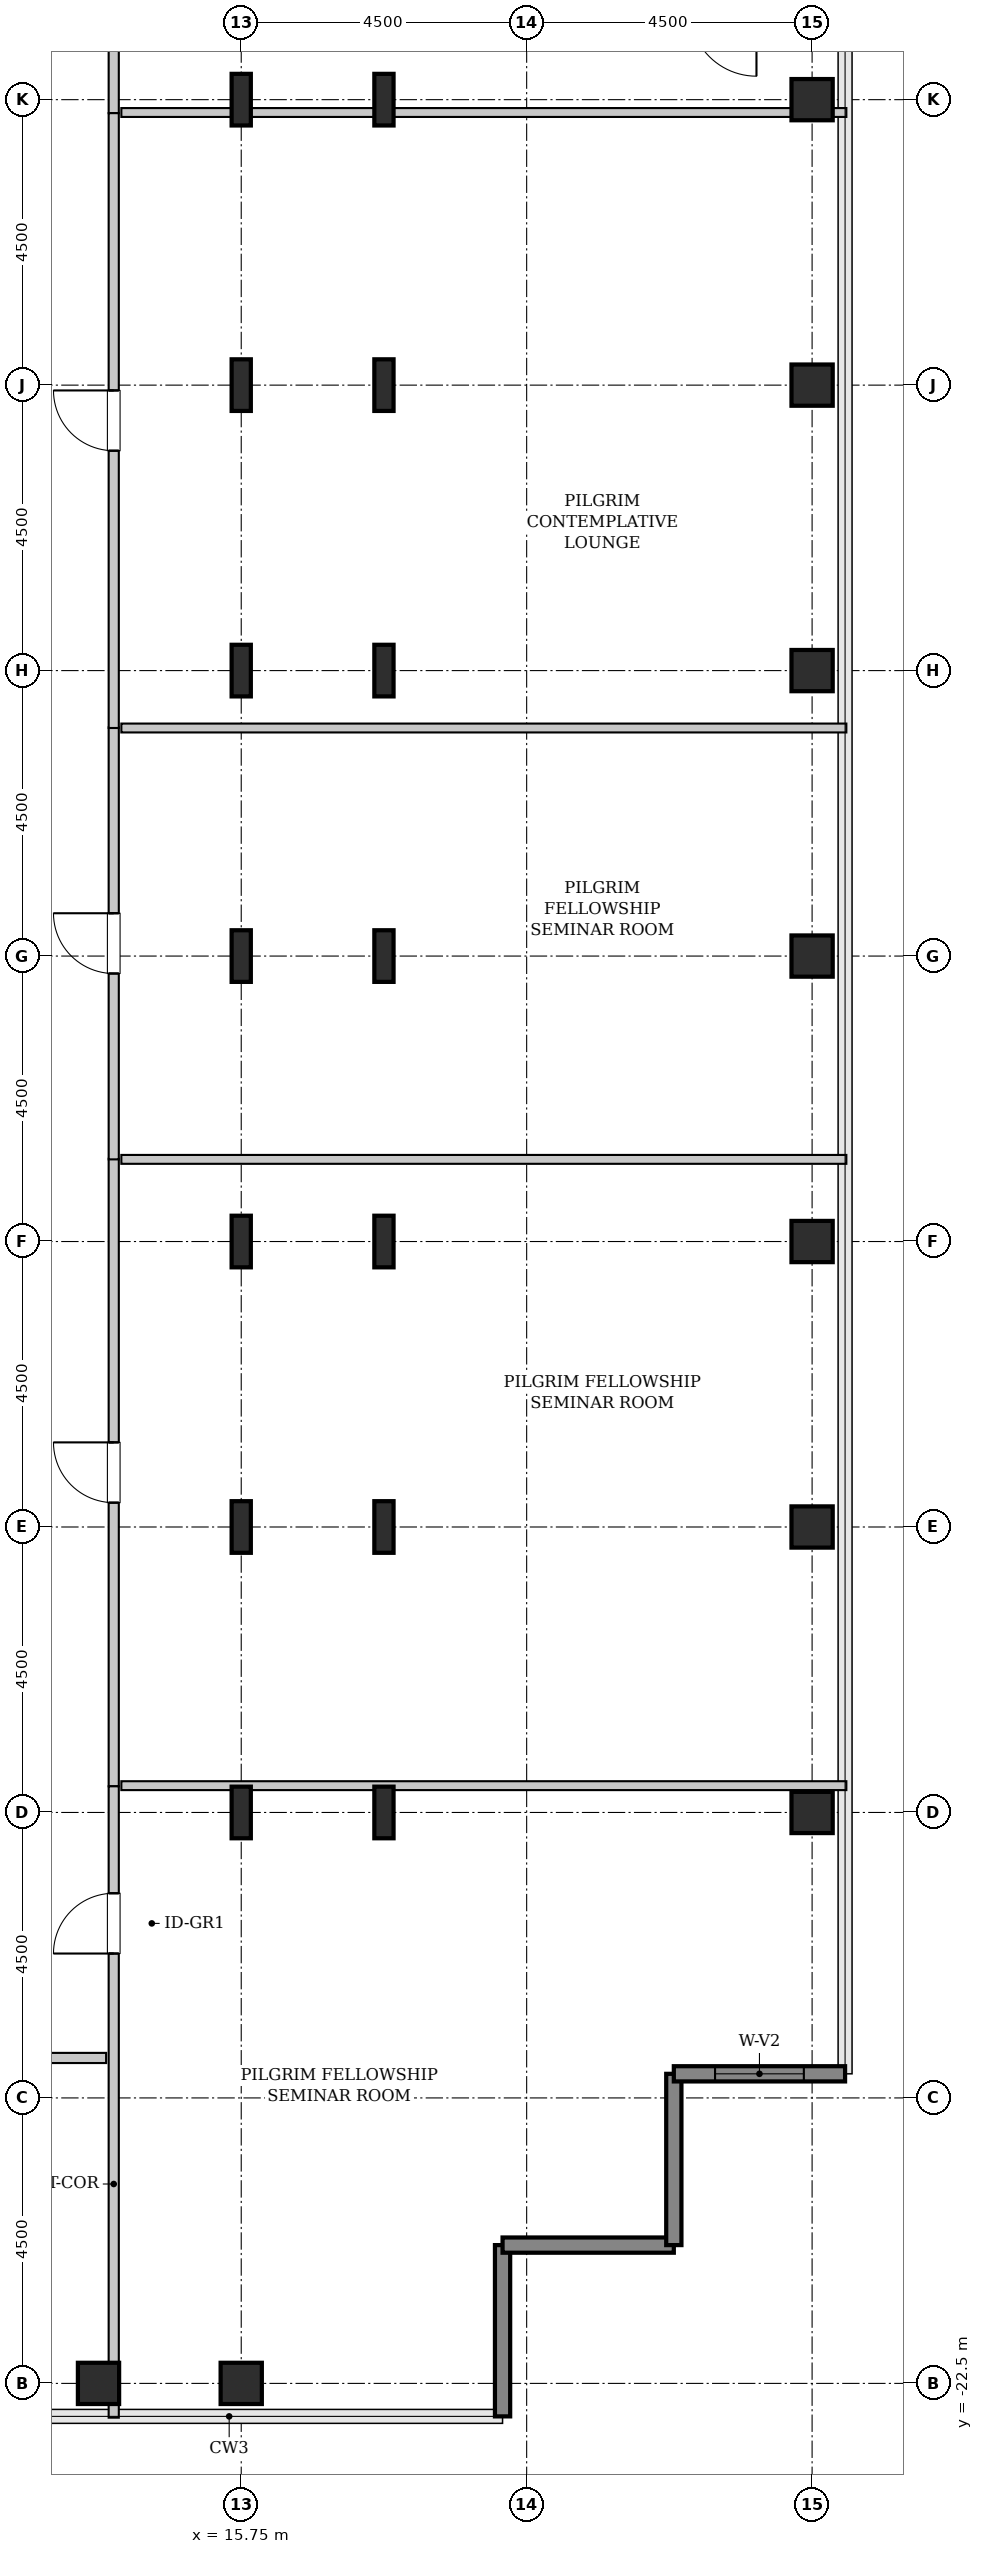
"""IFC4 building model, lengths in metres.
Left out: names, types, materials, properties, quantities, classifications, styles, units other than length and angle.
Written with IfcOpenShell. Run it as: python <this file> out.ifc"""

import sys

from ifc_helpers import new_model, si_unit, direction, frame, frame_2d, origin, origin_2d, place, context, subcontext, project, spatial, rectangle, hollow_rectangle, i_section, extrude, source, transform, mapped, element, fill, save


model = new_model("IFC4")
c1 = context("Model", 3, precision=1e-05, world=origin(), true_north=direction((0.0, 1.0)))
c2 = subcontext(c1, "Body", "Model", "MODEL_VIEW")
j1 = project(units=[si_unit("LENGTHUNIT", "METRE"), si_unit("PLANEANGLEUNIT", "RADIAN")], contexts=[c1])
p1 = place(None, origin())
s1 = spatial("IfcSite", under=j1, at=p1, CompositionType="ELEMENT")
p2 = place(p1, origin())
s2 = spatial("IfcBuilding", under=s1, at=p2, CompositionType="ELEMENT")
p3 = place(p2, frame((0.0, 0.0, 221.8)))
s3 = spatial("IfcBuildingStorey", under=s2, at=p3, CompositionType="ELEMENT", Elevation=221.8)
m1 = source(origin(), c2, "Body", "SweptSolid", [
    extrude(hollow_rectangle(XDim=0.65, YDim=0.65, WallThickness=0.032, InnerFilletRadius=0.032, OuterFilletRadius=0.064, at=origin_2d()), origin(), (0.0, 0.0, 1.0), 3.8),
])
for number, where, z_axis, x_axis in (
    (1, (13.5, -22.5, 0.0), (0.0, 0.0, 1.0), (1.0, 0.0, 0.0)),
    (2, (15.75, -22.5, 0.0), (0.0, 0.0, 1.0), (1.0, 0.0, 0.0)),
):
    element("IfcColumn", number, at=place(p3, frame(where, z_axis=z_axis, x_axis=x_axis)), inside=s3, PredefinedType="COLUMN", context=c2, shape_type="MappedRepresentation", body=[
        mapped(m1, transform((0.0, 0.0, 0.0), x_axis=(1.0, 0.0, 0.0), y_axis=(0.0, 1.0, 0.0), z_axis=(0.0, 0.0, 1.0), scale=1.0)),
    ])
m2 = source(origin(), c2, "Body", "SweptSolid", [
    extrude(i_section(OverallWidth=0.303, OverallDepth=0.814, WebThickness=0.021, FlangeThickness=0.04, FilletRadius=0.03, at=origin_2d()), origin(), (0.0, 0.0, 1.0), 3.8),
])
for number, where, z_axis, x_axis in (
    (3, (15.75, -13.5, 0.0), (0.0, 0.0, 1.0), (1.0, 0.0, 0.0)),
    (4, (15.75, -9.0, 0.0), (0.0, 0.0, 1.0), (1.0, 0.0, 0.0)),
    (5, (15.75, -4.5, 0.0), (0.0, 0.0, 1.0), (1.0, 0.0, 0.0)),
    (6, (15.75, 0.0, 0.0), (0.0, 0.0, 1.0), (1.0, 0.0, 0.0)),
    (7, (15.75, 4.5, 0.0), (0.0, 0.0, 1.0), (1.0, 0.0, 0.0)),
    (8, (15.75, 9.0, 0.0), (0.0, 0.0, 1.0), (1.0, 0.0, 0.0)),
    (9, (15.75, 13.5, 0.0), (0.0, 0.0, 1.0), (1.0, 0.0, 0.0)),
    (10, (18.0, -13.5, 0.0), (0.0, 0.0, 1.0), (1.0, 0.0, 0.0)),
    (11, (18.0, -9.0, 0.0), (0.0, 0.0, 1.0), (1.0, 0.0, 0.0)),
    (12, (18.0, -4.5, 0.0), (0.0, 0.0, 1.0), (1.0, 0.0, 0.0)),
    (13, (18.0, 0.0, 0.0), (0.0, 0.0, 1.0), (1.0, 0.0, 0.0)),
    (14, (18.0, 4.5, 0.0), (0.0, 0.0, 1.0), (1.0, 0.0, 0.0)),
    (15, (18.0, 9.0, 0.0), (0.0, 0.0, 1.0), (1.0, 0.0, 0.0)),
    (16, (18.0, 13.5, 0.0), (0.0, 0.0, 1.0), (1.0, 0.0, 0.0)),
):
    element("IfcColumn", number, at=place(p3, frame(where, z_axis=z_axis, x_axis=x_axis)), inside=s3, PredefinedType="COLUMN", context=c2, shape_type="MappedRepresentation", body=[
        mapped(m2, transform((0.0, 0.0, 0.0), x_axis=(1.0, 0.0, 0.0), y_axis=(0.0, 1.0, 0.0), z_axis=(0.0, 0.0, 1.0), scale=1.0)),
    ])
for number, where, z_axis, x_axis in (
    (17, (24.75, -13.5, 0.0), (0.0, 0.0, 1.0), (1.0, 0.0, 0.0)),
    (18, (24.75, -9.0, 0.0), (0.0, 0.0, 1.0), (1.0, 0.0, 0.0)),
    (19, (24.75, -4.5, 0.0), (0.0, 0.0, 1.0), (1.0, 0.0, 0.0)),
    (20, (24.75, 0.0, 0.0), (0.0, 0.0, 1.0), (1.0, 0.0, 0.0)),
    (21, (24.75, 4.5, 0.0), (0.0, 0.0, 1.0), (1.0, 0.0, 0.0)),
    (22, (24.75, 9.0, 0.0), (0.0, 0.0, 1.0), (1.0, 0.0, 0.0)),
    (23, (24.75, 13.5, 0.0), (0.0, 0.0, 1.0), (1.0, 0.0, 0.0)),
):
    element("IfcColumn", number, at=place(p3, frame(where, z_axis=z_axis, x_axis=x_axis)), inside=s3, PredefinedType="COLUMN", context=c2, shape_type="MappedRepresentation", body=[
        mapped(m1, transform((0.0, 0.0, 0.0), x_axis=(1.0, 0.0, 0.0), y_axis=(0.0, 1.0, 0.0), z_axis=(0.0, 0.0, 1.0), scale=1.0)),
    ])
m3 = source(origin(), c2, "Body", "SweptSolid", [
    extrude(rectangle(XDim=2.7, YDim=0.24, at=frame_2d((1.35, 0.0))), origin(), (0.0, 0.0, 1.0), 3.55),
])
for number, where, z_axis, x_axis in (
    (24, (19.87, -23.02, 0.0), (0.0, 0.0, 1.0), (0.0, 1.0, 0.0)),
    (25, (19.87, -20.32, 0.0), (0.0, 0.0, 1.0), (1.0, 0.0, 0.0)),
    (26, (22.57, -20.32, 0.0), (0.0, 0.0, 1.0), (0.0, 1.0, 0.0)),
):
    element("IfcWall", number, at=place(p3, frame(where, z_axis=z_axis, x_axis=x_axis)), inside=s3, PredefinedType="SHEAR", context=c2, shape_type="MappedRepresentation", body=[
        mapped(m3, transform((0.0, 0.0, 0.0), x_axis=(1.0, 0.0, 0.0), y_axis=(0.0, 1.0, 0.0), z_axis=(0.0, 0.0, 1.0), scale=1.0)),
    ])
p4 = place(p3, frame((22.57, -17.62, 0.0), z_axis=(0.0, 0.0, 1.0), x_axis=(1.0, 0.0, 0.0)))
e27 = element("IfcWall", 27, at=p4, inside=s3, PredefinedType="SHEAR", context=c2, shape_type="MappedRepresentation", body=[
    mapped(m3, transform((0.0, 0.0, 0.0), x_axis=(1.0, 0.0, 0.0), y_axis=(0.0, 1.0, 0.0), z_axis=(0.0, 0.0, 1.0), scale=1.0)),
])
p5 = place(p4, frame((0.65, 0.0, 0.85)))
e28 = element("IfcOpeningElement", 28, at=p5, cuts=e27, PredefinedType="OPENING", context=c2, shape_type="SweptSolid", body=[
    extrude(rectangle(XDim=1.4, YDim=1.8, at=frame_2d((0.7, 0.9))), frame((0.0, 0.13, 0.0), z_axis=(0.0, -1.0, 0.0), x_axis=(1.0, 0.0, 0.0)), (0.0, 0.0, 1.0), 0.26),
])
m4 = source(origin(), c2, "Body", "SweptSolid", [
    extrude(rectangle(XDim=9.892, YDim=0.16, at=frame_2d((4.946, 0.0))), origin(), (0.0, 0.0, 1.0), 3.535),
])
p6 = place(p3, frame((13.74, -13.087, 0.0), z_axis=(0.0, 0.0, 1.0), x_axis=(0.0, 1.0, 0.0)))
e29 = element("IfcWall", 29, at=p6, inside=s3, PredefinedType="PARTITIONING", context=c2, shape_type="MappedRepresentation", body=[
    mapped(m4, transform((0.0, 0.0, 0.0), x_axis=(1.0, 0.0, 0.0), y_axis=(0.0, 1.0, 0.0), z_axis=(0.0, 0.0, 1.0), scale=1.0)),
])
p7 = place(p6, frame((4.471, 0.0, 0.0)))
e30 = element("IfcOpeningElement", 30, at=p7, cuts=e29, PredefinedType="OPENING", context=c2, shape_type="SweptSolid", body=[
    extrude(rectangle(XDim=0.95, YDim=2.1, at=frame_2d((0.475, 1.05))), frame((0.0, 0.09, 0.0), z_axis=(0.0, -1.0, 0.0), x_axis=(1.0, 0.0, 0.0)), (0.0, 0.0, 1.0), 0.18),
])
m5 = source(origin(), c2, "Body", "SweptSolid", [
    extrude(rectangle(XDim=11.43, YDim=0.14, at=frame_2d((5.715, 0.0))), origin(), (0.0, 0.0, 1.0), 2.925),
])
p8 = place(p3, frame((13.86, -13.077, 0.0), z_axis=(0.0, 0.0, 1.0), x_axis=(1.0, 0.0, 0.0)))
e31 = element("IfcWall", 31, at=p8, inside=s3, PredefinedType="PARTITIONING", context=c2, shape_type="MappedRepresentation", body=[
    mapped(m5, transform((0.0, 0.0, 0.0), x_axis=(1.0, 0.0, 0.0), y_axis=(0.0, 1.0, 0.0), z_axis=(0.0, 0.0, 1.0), scale=1.0)),
])
m6 = source(origin(), c2, "Body", "SweptSolid", [
    extrude(rectangle(XDim=11.43, YDim=0.14, at=frame_2d((5.715, 0.0))), origin(), (0.0, 0.0, 1.0), 3.535),
])
p9 = place(p3, frame((13.86, -3.205, 0.0), z_axis=(0.0, 0.0, 1.0), x_axis=(1.0, 0.0, 0.0)))
e32 = element("IfcWall", 32, at=p9, inside=s3, PredefinedType="PARTITIONING", context=c2, shape_type="MappedRepresentation", body=[
    mapped(m6, transform((0.0, 0.0, 0.0), x_axis=(1.0, 0.0, 0.0), y_axis=(0.0, 1.0, 0.0), z_axis=(0.0, 0.0, 1.0), scale=1.0)),
])
m7 = source(origin(), c2, "Body", "SweptSolid", [
    extrude(rectangle(XDim=9.953, YDim=0.16, at=frame_2d((4.976, 0.0))), origin(), (0.0, 0.0, 1.0), 3.535),
])
p10 = place(p3, frame((13.74, -23.04, 0.0), z_axis=(0.0, 0.0, 1.0), x_axis=(0.0, 1.0, 0.0)))
e33 = element("IfcWall", 33, at=p10, inside=s3, PredefinedType="PARTITIONING", context=c2, shape_type="MappedRepresentation", body=[
    mapped(m7, transform((0.0, 0.0, 0.0), x_axis=(1.0, 0.0, 0.0), y_axis=(0.0, 1.0, 0.0), z_axis=(0.0, 0.0, 1.0), scale=1.0)),
])
p11 = place(p10, frame((7.316, 0.0, 0.0)))
e34 = element("IfcOpeningElement", 34, at=p11, cuts=e33, PredefinedType="OPENING", context=c2, shape_type="SweptSolid", body=[
    extrude(rectangle(XDim=0.95, YDim=2.1, at=frame_2d((0.475, 1.05))), frame((0.0, 0.09, 0.0), z_axis=(0.0, -1.0, 0.0), x_axis=(1.0, 0.0, 0.0)), (0.0, 0.0, 1.0), 0.18),
])
m8 = source(origin(), c2, "Body", "SweptSolid", [
    extrude(rectangle(XDim=6.81, YDim=0.16, at=frame_2d((3.405, 0.0))), origin(), (0.0, 0.0, 1.0), 3.535),
])
p12 = place(p3, frame((13.74, -3.205, 0.0), z_axis=(0.0, 0.0, 1.0), x_axis=(0.0, 1.0, 0.0)))
e35 = element("IfcWall", 35, at=p12, inside=s3, PredefinedType="PARTITIONING", context=c2, shape_type="MappedRepresentation", body=[
    mapped(m8, transform((0.0, 0.0, 0.0), x_axis=(1.0, 0.0, 0.0), y_axis=(0.0, 1.0, 0.0), z_axis=(0.0, 0.0, 1.0), scale=1.0)),
])
p13 = place(p12, frame((2.93, 0.0, 0.0)))
e36 = element("IfcOpeningElement", 36, at=p13, cuts=e35, PredefinedType="OPENING", context=c2, shape_type="SweptSolid", body=[
    extrude(rectangle(XDim=0.95, YDim=2.1, at=frame_2d((0.475, 1.05))), frame((0.0, 0.09, 0.0), z_axis=(0.0, -1.0, 0.0), x_axis=(1.0, 0.0, 0.0)), (0.0, 0.0, 1.0), 0.18),
])
p14 = place(p3, frame((13.86, 3.595, 0.0), z_axis=(0.0, 0.0, 1.0), x_axis=(1.0, 0.0, 0.0)))
e37 = element("IfcWall", 37, at=p14, inside=s3, PredefinedType="PARTITIONING", context=c2, shape_type="MappedRepresentation", body=[
    mapped(m6, transform((0.0, 0.0, 0.0), x_axis=(1.0, 0.0, 0.0), y_axis=(0.0, 1.0, 0.0), z_axis=(0.0, 0.0, 1.0), scale=1.0)),
])
m9 = source(origin(), c2, "Body", "SweptSolid", [
    extrude(rectangle(XDim=9.752, YDim=0.16, at=frame_2d((4.876, 0.0))), origin(), (0.0, 0.0, 1.0), 3.535),
])
p15 = place(p3, frame((13.74, 13.288, 0.0), z_axis=(0.0, 0.0, 1.0), x_axis=(0.0, 1.0, 0.0)))
e38 = element("IfcWall", 38, at=p15, inside=s3, PredefinedType="PARTITIONING", context=c2, shape_type="MappedRepresentation", body=[
    mapped(m9, transform((0.0, 0.0, 0.0), x_axis=(1.0, 0.0, 0.0), y_axis=(0.0, 1.0, 0.0), z_axis=(0.0, 0.0, 1.0), scale=1.0)),
])
p16 = place(p15, frame((1.586, 0.0, 0.0)))
e39 = element("IfcOpeningElement", 39, at=p16, cuts=e38, PredefinedType="OPENING", context=c2, shape_type="SweptSolid", body=[
    extrude(rectangle(XDim=0.95, YDim=2.1, at=frame_2d((0.475, 1.05))), frame((0.0, 0.09, 0.0), z_axis=(0.0, -1.0, 0.0), x_axis=(1.0, 0.0, 0.0)), (0.0, 0.0, 1.0), 0.18),
])
p17 = place(p3, frame((13.86, 13.298, 0.0), z_axis=(0.0, 0.0, 1.0), x_axis=(1.0, 0.0, 0.0)))
e40 = element("IfcWall", 40, at=p17, inside=s3, PredefinedType="PARTITIONING", context=c2, shape_type="MappedRepresentation", body=[
    mapped(m5, transform((0.0, 0.0, 0.0), x_axis=(1.0, 0.0, 0.0), y_axis=(0.0, 1.0, 0.0), z_axis=(0.0, 0.0, 1.0), scale=1.0)),
])
m10 = source(origin(), c2, "Body", "SweptSolid", [
    extrude(rectangle(XDim=9.693, YDim=0.16, at=frame_2d((4.846, 0.0))), origin(), (0.0, 0.0, 1.0), 3.535),
])
p18 = place(p3, frame((13.74, 3.595, 0.0), z_axis=(0.0, 0.0, 1.0), x_axis=(0.0, 1.0, 0.0)))
e41 = element("IfcWall", 41, at=p18, inside=s3, PredefinedType="PARTITIONING", context=c2, shape_type="MappedRepresentation", body=[
    mapped(m10, transform((0.0, 0.0, 0.0), x_axis=(1.0, 0.0, 0.0), y_axis=(0.0, 1.0, 0.0), z_axis=(0.0, 0.0, 1.0), scale=1.0)),
])
p19 = place(p18, frame((4.371, 0.0, 0.0)))
e42 = element("IfcOpeningElement", 42, at=p19, cuts=e41, PredefinedType="OPENING", context=c2, shape_type="SweptSolid", body=[
    extrude(rectangle(XDim=0.95, YDim=2.1, at=frame_2d((0.475, 1.05))), frame((0.0, 0.09, 0.0), z_axis=(0.0, -1.0, 0.0), x_axis=(1.0, 0.0, 0.0)), (0.0, 0.0, 1.0), 0.18),
])
m11 = source(origin(), c2, "Body", "SweptSolid", [
    extrude(rectangle(XDim=9.425, YDim=0.16, at=frame_2d((4.712, 0.0))), origin(), (0.0, 0.0, 1.0), 3.535),
])
p20 = place(p3, frame((4.195, -17.37, 0.0), z_axis=(0.0, 0.0, 1.0), x_axis=(1.0, 0.0, 0.0)))
e43 = element("IfcWall", 43, at=p20, inside=s3, PredefinedType="PARTITIONING", context=c2, shape_type="MappedRepresentation", body=[
    mapped(m11, transform((0.0, 0.0, 0.0), x_axis=(1.0, 0.0, 0.0), y_axis=(0.0, 1.0, 0.0), z_axis=(0.0, 0.0, 1.0), scale=1.0)),
])
p21 = place(p20, frame((4.238, 0.0, 0.0)))
e44 = element("IfcOpeningElement", 44, at=p21, cuts=e43, PredefinedType="OPENING", context=c2, shape_type="SweptSolid", body=[
    extrude(rectangle(XDim=0.95, YDim=2.1, at=frame_2d((0.475, 1.05))), frame((0.0, 0.09, 0.0), z_axis=(0.0, -1.0, 0.0), x_axis=(1.0, 0.0, 0.0)), (0.0, 0.0, 1.0), 0.18),
])
m12 = source(origin(), c2, "Body", "SweptSolid", [
    extrude(rectangle(XDim=1.4, YDim=1.8, at=frame_2d((0.7, 0.9))), frame((0.0, 0.03, 0.0), z_axis=(0.0, -1.0, 0.0), x_axis=(1.0, 0.0, 0.0)), (0.0, 0.0, 1.0), 0.06),
])
p22 = place(p5, origin())
e45 = element("IfcWindow", 45, at=p22, inside=s3, PartitioningType="SINGLE_PANEL", PredefinedType="WINDOW", context=c2, shape_type="MappedRepresentation", body=[
    mapped(m12, transform((0.0, 0.0, 0.0), x_axis=(1.0, 0.0, 0.0), y_axis=(0.0, 1.0, 0.0), z_axis=(0.0, 0.0, 1.0), scale=1.0)),
])
fill(e28, e45)
m13 = source(origin(), c2, "Body", "SweptSolid", [
    extrude(rectangle(XDim=0.95, YDim=2.1, at=frame_2d((0.475, 1.05))), frame((0.0, 0.025, 0.0), z_axis=(0.0, -1.0, 0.0), x_axis=(1.0, 0.0, 0.0)), (0.0, 0.0, 1.0), 0.05),
])
p23 = place(p7, origin())
e46 = element("IfcDoor", 46, at=p23, inside=s3, OperationType="SINGLE_SWING_RIGHT", PredefinedType="DOOR", context=c2, shape_type="MappedRepresentation", body=[
    mapped(m13, transform((0.0, 0.0, 0.0), x_axis=(1.0, 0.0, 0.0), y_axis=(0.0, 1.0, 0.0), z_axis=(0.0, 0.0, 1.0), scale=1.0)),
])
fill(e30, e46)
p24 = place(p11, origin())
e47 = element("IfcDoor", 47, at=p24, inside=s3, OperationType="SINGLE_SWING_LEFT", PredefinedType="DOOR", context=c2, shape_type="MappedRepresentation", body=[
    mapped(m13, transform((0.0, 0.0, 0.0), x_axis=(1.0, 0.0, 0.0), y_axis=(0.0, 1.0, 0.0), z_axis=(0.0, 0.0, 1.0), scale=1.0)),
])
fill(e34, e47)
p25 = place(p13, origin())
e48 = element("IfcDoor", 48, at=p25, inside=s3, OperationType="SINGLE_SWING_RIGHT", PredefinedType="DOOR", context=c2, shape_type="MappedRepresentation", body=[
    mapped(m13, transform((0.0, 0.0, 0.0), x_axis=(1.0, 0.0, 0.0), y_axis=(0.0, 1.0, 0.0), z_axis=(0.0, 0.0, 1.0), scale=1.0)),
])
fill(e36, e48)
p26 = place(p19, origin())
e49 = element("IfcDoor", 49, at=p26, inside=s3, OperationType="SINGLE_SWING_RIGHT", PredefinedType="DOOR", context=c2, shape_type="MappedRepresentation", body=[
    mapped(m13, transform((0.0, 0.0, 0.0), x_axis=(1.0, 0.0, 0.0), y_axis=(0.0, 1.0, 0.0), z_axis=(0.0, 0.0, 1.0), scale=1.0)),
])
fill(e42, e49)
save(model, sys.argv[1])
